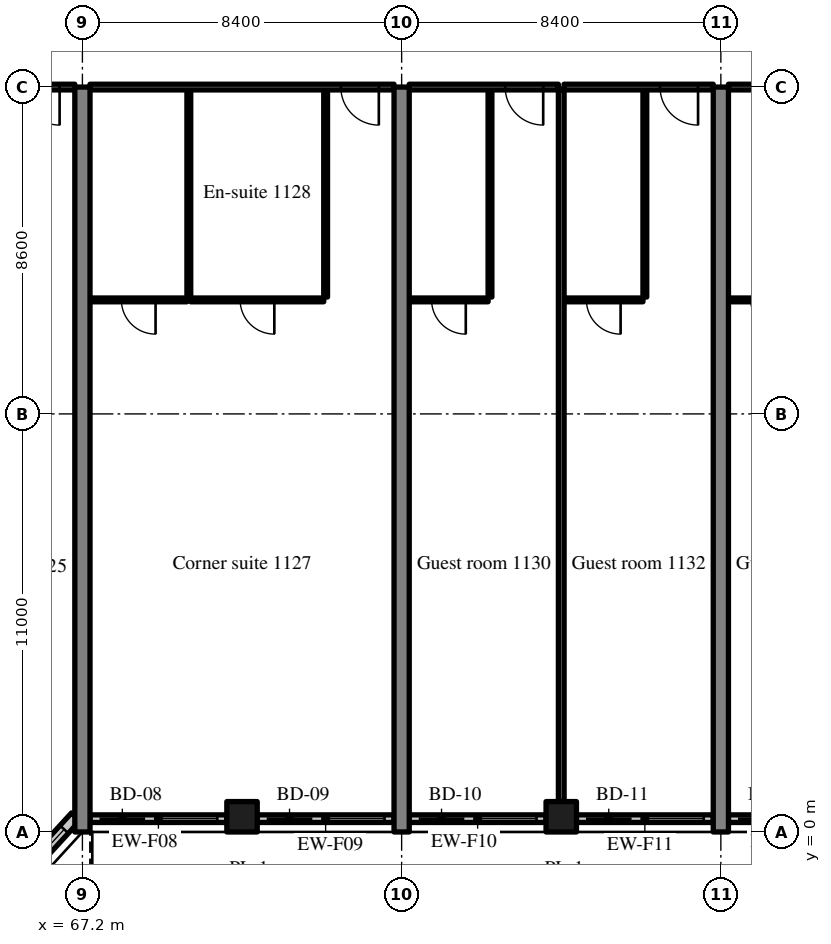
"""IFC4 building model, lengths in metres.
Left out: names, types, materials, properties, quantities, classifications, styles, units other than length and angle.
Written with IfcOpenShell. Run it as: python <this file> out.ifc"""

import sys

from ifc_helpers import new_model, si_unit, direction, frame, frame_2d, origin, origin_2d, place, context, subcontext, project, spatial, rectangle, extrude, source, transform, mapped, element, fill, save


model = new_model("IFC4")
c1 = context("Model", 3, precision=1e-05, world=origin(), true_north=direction((0.0, 1.0)))
c2 = subcontext(c1, "Body", "Model", "MODEL_VIEW")
j1 = project(units=[si_unit("LENGTHUNIT", "METRE"), si_unit("PLANEANGLEUNIT", "RADIAN")], contexts=[c1])
p1 = place(None, origin())
s1 = spatial("IfcSite", under=j1, at=p1, CompositionType="ELEMENT")
p2 = place(p1, origin())
s2 = spatial("IfcBuilding", under=s1, at=p2, CompositionType="ELEMENT")
p3 = place(p2, frame((0.0, 0.0, 50.6)))
s3 = spatial("IfcBuildingStorey", under=s2, at=p3, CompositionType="ELEMENT", Elevation=50.6)
m1 = source(origin(), c2, "Body", "SweptSolid", [
    extrude(rectangle(XDim=19.6, YDim=0.4, at=frame_2d((9.8, 0.0))), origin(), (0.0, 0.0, 1.0), 3.52),
])
for number, where, z_axis, x_axis in (
    (1, (67.2, 0.0, 0.0), (0.0, 0.0, 1.0), (0.0, 1.0, 0.0)),
    (2, (75.6, 0.0, 0.0), (0.0, 0.0, 1.0), (0.0, 1.0, 0.0)),
    (3, (84.0, 0.0, 0.0), (0.0, 0.0, 1.0), (0.0, 1.0, 0.0)),
):
    element("IfcWall", number, at=place(p3, frame(where, z_axis=z_axis, x_axis=x_axis)), inside=s3, PredefinedType="SHEAR", context=c2, shape_type="MappedRepresentation", body=[
        mapped(m1, transform((0.0, 0.0, 0.0), scale=1.0)),
    ])
m2 = source(origin(), c2, "Body", "SweptSolid", [
    extrude(rectangle(XDim=0.8, YDim=0.8, at=origin_2d()), origin(), (0.0, 0.0, 1.0), 3.52),
])
for number, where, z_axis, x_axis in (
    (4, (71.4, 0.4, 0.0), (0.0, 0.0, 1.0), (1.0, 0.0, 0.0)),
    (5, (79.8, 0.4, 0.0), (0.0, 0.0, 1.0), (1.0, 0.0, 0.0)),
):
    element("IfcColumn", number, at=place(p3, frame(where, z_axis=z_axis, x_axis=x_axis)), inside=s3, PredefinedType="COLUMN", context=c2, shape_type="MappedRepresentation", body=[
        mapped(m2, transform((0.0, 0.0, 0.0), scale=1.0)),
    ])
m3 = source(origin(), c2, "Body", "SweptSolid", [
    extrude(rectangle(XDim=2.398, YDim=0.3, at=frame_2d((1.199, 0.0))), origin(), (0.0, 0.0, 1.0), 3.52),
])
p4 = place(p3, frame((65.404, -1.369, 0.0), z_axis=(0.0, 0.0, 1.0), x_axis=(0.675374189419, 0.737475222815, 0.0)))
e6 = element("IfcWall", 6, at=p4, inside=s3, PredefinedType="SOLIDWALL", context=c2, shape_type="MappedRepresentation", body=[
    mapped(m3, transform((0.0, 0.0, 0.0), scale=1.0)),
])
m4 = source(origin(), c2, "Body", "SweptSolid", [
    extrude(rectangle(XDim=1.5, YDim=2.0, at=frame_2d((0.75, 1.0))), frame((0.0, 0.16, 0.0), z_axis=(0.0, -1.0, 0.0), x_axis=(1.0, 0.0, 0.0)), (0.0, 0.0, 1.0), 0.32),
])
p5 = place(p4, frame((0.449, 0.0, 0.9)))
e7 = element("IfcOpeningElement", 7, at=p5, cuts=e6, PredefinedType="OPENING", context=c2, shape_type="MappedRepresentation", body=[
    mapped(m4, transform((0.0, 0.0, 0.0), scale=1.0)),
])
m5 = source(origin(), c2, "Body", "SweptSolid", [
    extrude(rectangle(XDim=3.6, YDim=0.2, at=frame_2d((1.8, 0.0))), origin(), (0.0, 0.0, 1.0), 2.82),
])
p6 = place(p3, frame((67.4, 0.35, 0.0), z_axis=(0.0, 0.0, 1.0), x_axis=(1.0, 0.0, 0.0)))
e8 = element("IfcWall", 8, at=p6, inside=s3, PredefinedType="SOLIDWALL", context=c2, shape_type="MappedRepresentation", body=[
    mapped(m5, transform((0.0, 0.0, 0.0), scale=1.0)),
])
m6 = source(origin(), c2, "Body", "SweptSolid", [
    extrude(rectangle(XDim=1.2, YDim=2.4, at=frame_2d((0.6, 1.2))), frame((0.0, 0.11, 0.0), z_axis=(0.0, -1.0, 0.0), x_axis=(1.0, 0.0, 0.0)), (0.0, 0.0, 1.0), 0.22),
])
p7 = place(p6, frame((0.25, 0.0, 0.0)))
e9 = element("IfcOpeningElement", 9, at=p7, cuts=e8, PredefinedType="OPENING", context=c2, shape_type="MappedRepresentation", body=[
    mapped(m6, transform((0.0, 0.0, 0.0), scale=1.0)),
])
m7 = source(origin(), c2, "Body", "SweptSolid", [
    extrude(rectangle(XDim=1.5, YDim=1.5, at=frame_2d((0.75, 0.75))), frame((0.0, 0.11, 0.0), z_axis=(0.0, -1.0, 0.0), x_axis=(1.0, 0.0, 0.0)), (0.0, 0.0, 1.0), 0.22),
])
p8 = place(p6, frame((1.85, 0.0, 0.9)))
e10 = element("IfcOpeningElement", 10, at=p8, cuts=e8, PredefinedType="OPENING", context=c2, shape_type="MappedRepresentation", body=[
    mapped(m7, transform((0.0, 0.0, 0.0), scale=1.0)),
])
m8 = source(origin(), c2, "Body", "SweptSolid", [
    extrude(rectangle(XDim=3.6, YDim=0.2, at=frame_2d((1.8, 0.0))), origin(), (0.0, 0.0, 1.0), 2.82),
])
p9 = place(p3, frame((71.8, 0.35, 0.0), z_axis=(0.0, 0.0, 1.0), x_axis=(1.0, 0.0, 0.0)))
e11 = element("IfcWall", 11, at=p9, inside=s3, PredefinedType="SOLIDWALL", context=c2, shape_type="MappedRepresentation", body=[
    mapped(m8, transform((0.0, 0.0, 0.0), scale=1.0)),
])
p10 = place(p9, frame((0.25, 0.0, 0.0)))
e12 = element("IfcOpeningElement", 12, at=p10, cuts=e11, PredefinedType="OPENING", context=c2, shape_type="MappedRepresentation", body=[
    mapped(m6, transform((0.0, 0.0, 0.0), scale=1.0)),
])
p11 = place(p9, frame((1.85, 0.0, 0.9)))
e13 = element("IfcOpeningElement", 13, at=p11, cuts=e11, PredefinedType="OPENING", context=c2, shape_type="MappedRepresentation", body=[
    mapped(m7, transform((0.0, 0.0, 0.0), scale=1.0)),
])
p12 = place(p3, frame((75.8, 0.35, 0.0), z_axis=(0.0, 0.0, 1.0), x_axis=(1.0, 0.0, 0.0)))
e14 = element("IfcWall", 14, at=p12, inside=s3, PredefinedType="SOLIDWALL", context=c2, shape_type="MappedRepresentation", body=[
    mapped(m8, transform((0.0, 0.0, 0.0), scale=1.0)),
])
p13 = place(p12, frame((0.25, 0.0, 0.0)))
e15 = element("IfcOpeningElement", 15, at=p13, cuts=e14, PredefinedType="OPENING", context=c2, shape_type="MappedRepresentation", body=[
    mapped(m6, transform((0.0, 0.0, 0.0), scale=1.0)),
])
p14 = place(p12, frame((1.85, 0.0, 0.9)))
e16 = element("IfcOpeningElement", 16, at=p14, cuts=e14, PredefinedType="OPENING", context=c2, shape_type="MappedRepresentation", body=[
    mapped(m7, transform((0.0, 0.0, 0.0), scale=1.0)),
])
p15 = place(p3, frame((80.2, 0.35, 0.0), z_axis=(0.0, 0.0, 1.0), x_axis=(1.0, 0.0, 0.0)))
e17 = element("IfcWall", 17, at=p15, inside=s3, PredefinedType="SOLIDWALL", context=c2, shape_type="MappedRepresentation", body=[
    mapped(m5, transform((0.0, 0.0, 0.0), scale=1.0)),
])
p16 = place(p15, frame((0.25, 0.0, 0.0)))
e18 = element("IfcOpeningElement", 18, at=p16, cuts=e17, PredefinedType="OPENING", context=c2, shape_type="MappedRepresentation", body=[
    mapped(m6, transform((0.0, 0.0, 0.0), scale=1.0)),
])
p17 = place(p15, frame((1.85, 0.0, 0.9)))
e19 = element("IfcOpeningElement", 19, at=p17, cuts=e17, PredefinedType="OPENING", context=c2, shape_type="MappedRepresentation", body=[
    mapped(m7, transform((0.0, 0.0, 0.0), scale=1.0)),
])
p18 = place(p3, frame((84.2, 0.35, 0.0), z_axis=(0.0, 0.0, 1.0), x_axis=(1.0, 0.0, 0.0)))
e20 = element("IfcWall", 20, at=p18, inside=s3, PredefinedType="SOLIDWALL", context=c2, shape_type="MappedRepresentation", body=[
    mapped(m5, transform((0.0, 0.0, 0.0), scale=1.0)),
])
p19 = place(p18, frame((0.25, 0.0, 0.0)))
e21 = element("IfcOpeningElement", 21, at=p19, cuts=e20, PredefinedType="OPENING", context=c2, shape_type="MappedRepresentation", body=[
    mapped(m6, transform((0.0, 0.0, 0.0), scale=1.0)),
])
p20 = place(p18, frame((1.85, 0.0, 0.9)))
e22 = element("IfcOpeningElement", 22, at=p20, cuts=e20, PredefinedType="OPENING", context=c2, shape_type="MappedRepresentation", body=[
    mapped(m7, transform((0.0, 0.0, 0.0), scale=1.0)),
])
m9 = source(origin(), c2, "Body", "SweptSolid", [
    extrude(rectangle(XDim=3.925, YDim=0.15, at=frame_2d((1.962, 0.0))), origin(), (0.0, 0.0, 1.0), 2.82),
])
p21 = place(p3, frame((63.075, 19.6, 0.0), z_axis=(0.0, 0.0, 1.0), x_axis=(1.0, 0.0, 0.0)))
e23 = element("IfcWall", 23, at=p21, inside=s3, PredefinedType="PARTITIONING", context=c2, shape_type="MappedRepresentation", body=[
    mapped(m9, transform((0.0, 0.0, 0.0), scale=1.0)),
])
m10 = source(origin(), c2, "Body", "SweptSolid", [
    extrude(rectangle(XDim=1.0, YDim=2.1, at=frame_2d((0.5, 1.05))), frame((0.0, 0.085, 0.0), z_axis=(0.0, -1.0, 0.0), x_axis=(1.0, 0.0, 0.0)), (0.0, 0.0, 1.0), 0.17),
])
p22 = place(p21, frame((2.525, 0.0, 0.0)))
e24 = element("IfcOpeningElement", 24, at=p22, cuts=e23, PredefinedType="OPENING", context=c2, shape_type="MappedRepresentation", body=[
    mapped(m10, transform((0.0, 0.0, 0.0), scale=1.0)),
])
m11 = source(origin(), c2, "Body", "SweptSolid", [
    extrude(rectangle(XDim=5.45, YDim=0.1, at=frame_2d((2.725, 0.0))), origin(), (0.0, 0.0, 1.0), 3.52),
])
for number, where, z_axis, x_axis in (
    (25, (73.6, 14.075, 0.0), (0.0, 0.0, 1.0), (0.0, 1.0, 0.0)),
    (26, (70.0, 14.075, 0.0), (0.0, 0.0, 1.0), (0.0, 1.0, 0.0)),
):
    element("IfcWall", number, at=place(p3, frame(where, z_axis=z_axis, x_axis=x_axis)), inside=s3, PredefinedType="PARTITIONING", context=c2, shape_type="MappedRepresentation", body=[
        mapped(m11, transform((0.0, 0.0, 0.0), scale=1.0)),
    ])
m12 = source(origin(), c2, "Body", "SweptSolid", [
    extrude(rectangle(XDim=3.5, YDim=0.1, at=frame_2d((1.75, 0.0))), origin(), (0.0, 0.0, 1.0), 3.52),
])
p23 = place(p3, frame((70.05, 14.0, 0.0), z_axis=(0.0, 0.0, 1.0), x_axis=(1.0, 0.0, 0.0)))
e27 = element("IfcWall", 27, at=p23, inside=s3, PredefinedType="PARTITIONING", context=c2, shape_type="MappedRepresentation", body=[
    mapped(m12, transform((0.0, 0.0, 0.0), scale=1.0)),
])
m13 = source(origin(), c2, "Body", "SweptSolid", [
    extrude(rectangle(XDim=0.9, YDim=2.1, at=frame_2d((0.45, 1.05))), frame((0.0, 0.06, 0.0), z_axis=(0.0, -1.0, 0.0), x_axis=(1.0, 0.0, 0.0)), (0.0, 0.0, 1.0), 0.12),
])
p24 = place(p23, frame((1.3, 0.0, 0.0)))
e28 = element("IfcOpeningElement", 28, at=p24, cuts=e27, PredefinedType="OPENING", context=c2, shape_type="MappedRepresentation", body=[
    mapped(m13, transform((0.0, 0.0, 0.0), scale=1.0)),
])
m14 = source(origin(), c2, "Body", "SweptSolid", [
    extrude(rectangle(XDim=2.55, YDim=0.1, at=frame_2d((1.275, 0.0))), origin(), (0.0, 0.0, 1.0), 3.52),
])
p25 = place(p3, frame((67.4, 14.0, 0.0), z_axis=(0.0, 0.0, 1.0), x_axis=(1.0, 0.0, 0.0)))
e29 = element("IfcWall", 29, at=p25, inside=s3, PredefinedType="PARTITIONING", context=c2, shape_type="MappedRepresentation", body=[
    mapped(m14, transform((0.0, 0.0, 0.0), scale=1.0)),
])
p26 = place(p25, frame((0.825, 0.0, 0.0)))
e30 = element("IfcOpeningElement", 30, at=p26, cuts=e29, PredefinedType="OPENING", context=c2, shape_type="MappedRepresentation", body=[
    mapped(m13, transform((0.0, 0.0, 0.0), scale=1.0)),
])
m15 = source(origin(), c2, "Body", "SweptSolid", [
    extrude(rectangle(XDim=8.0, YDim=0.15, at=frame_2d((4.0, 0.0))), origin(), (0.0, 0.0, 1.0), 2.82),
])
p27 = place(p3, frame((67.4, 19.6, 0.0), z_axis=(0.0, 0.0, 1.0), x_axis=(1.0, 0.0, 0.0)))
e31 = element("IfcWall", 31, at=p27, inside=s3, PredefinedType="PARTITIONING", context=c2, shape_type="MappedRepresentation", body=[
    mapped(m15, transform((0.0, 0.0, 0.0), scale=1.0)),
])
p28 = place(p27, frame((6.6, 0.0, 0.0)))
e32 = element("IfcOpeningElement", 32, at=p28, cuts=e31, PredefinedType="OPENING", context=c2, shape_type="MappedRepresentation", body=[
    mapped(m10, transform((0.0, 0.0, 0.0), scale=1.0)),
])
p29 = place(p3, frame((77.925, 14.075, 0.0), z_axis=(0.0, 0.0, 1.0), x_axis=(0.0, 1.0, 0.0)))
e33 = element("IfcWall", 33, at=p29, inside=s3, PredefinedType="PARTITIONING", context=c2, shape_type="MappedRepresentation", body=[
    mapped(m11, transform((0.0, 0.0, 0.0), scale=1.0)),
])
m16 = source(origin(), c2, "Body", "SweptSolid", [
    extrude(rectangle(XDim=2.075, YDim=0.1, at=frame_2d((1.038, 0.0))), origin(), (0.0, 0.0, 1.0), 3.52),
])
p30 = place(p3, frame((75.8, 14.0, 0.0), z_axis=(0.0, 0.0, 1.0), x_axis=(1.0, 0.0, 0.0)))
e34 = element("IfcWall", 34, at=p30, inside=s3, PredefinedType="PARTITIONING", context=c2, shape_type="MappedRepresentation", body=[
    mapped(m16, transform((0.0, 0.0, 0.0), scale=1.0)),
])
p31 = place(p30, frame((0.588, 0.0, 0.0)))
e35 = element("IfcOpeningElement", 35, at=p31, cuts=e34, PredefinedType="OPENING", context=c2, shape_type="MappedRepresentation", body=[
    mapped(m13, transform((0.0, 0.0, 0.0), scale=1.0)),
])
p32 = place(p3, frame((75.8, 19.6, 0.0), z_axis=(0.0, 0.0, 1.0), x_axis=(1.0, 0.0, 0.0)))
e36 = element("IfcWall", 36, at=p32, inside=s3, PredefinedType="PARTITIONING", context=c2, shape_type="MappedRepresentation", body=[
    mapped(m9, transform((0.0, 0.0, 0.0), scale=1.0)),
])
p33 = place(p32, frame((2.525, 0.0, 0.0)))
e37 = element("IfcOpeningElement", 37, at=p33, cuts=e36, PredefinedType="OPENING", context=c2, shape_type="MappedRepresentation", body=[
    mapped(m10, transform((0.0, 0.0, 0.0), scale=1.0)),
])
p34 = place(p3, frame((82.0, 14.075, 0.0), z_axis=(0.0, 0.0, 1.0), x_axis=(0.0, 1.0, 0.0)))
e38 = element("IfcWall", 38, at=p34, inside=s3, PredefinedType="PARTITIONING", context=c2, shape_type="MappedRepresentation", body=[
    mapped(m11, transform((0.0, 0.0, 0.0), scale=1.0)),
])
p35 = place(p3, frame((79.875, 14.0, 0.0), z_axis=(0.0, 0.0, 1.0), x_axis=(1.0, 0.0, 0.0)))
e39 = element("IfcWall", 39, at=p35, inside=s3, PredefinedType="PARTITIONING", context=c2, shape_type="MappedRepresentation", body=[
    mapped(m16, transform((0.0, 0.0, 0.0), scale=1.0)),
])
p36 = place(p35, frame((0.587, 0.0, 0.0)))
e40 = element("IfcOpeningElement", 40, at=p36, cuts=e39, PredefinedType="OPENING", context=c2, shape_type="MappedRepresentation", body=[
    mapped(m13, transform((0.0, 0.0, 0.0), scale=1.0)),
])
p37 = place(p3, frame((79.875, 19.6, 0.0), z_axis=(0.0, 0.0, 1.0), x_axis=(1.0, 0.0, 0.0)))
e41 = element("IfcWall", 41, at=p37, inside=s3, PredefinedType="PARTITIONING", context=c2, shape_type="MappedRepresentation", body=[
    mapped(m9, transform((0.0, 0.0, 0.0), scale=1.0)),
])
p38 = place(p37, frame((2.525, 0.0, 0.0)))
e42 = element("IfcOpeningElement", 42, at=p38, cuts=e41, PredefinedType="OPENING", context=c2, shape_type="MappedRepresentation", body=[
    mapped(m10, transform((0.0, 0.0, 0.0), scale=1.0)),
])
m17 = source(origin(), c2, "Body", "SweptSolid", [
    extrude(rectangle(XDim=18.725, YDim=0.15, at=frame_2d((9.362, 0.0))), origin(), (0.0, 0.0, 1.0), 3.52),
])
p39 = place(p3, frame((79.8, 0.8, 0.0), z_axis=(0.0, 0.0, 1.0), x_axis=(0.0, 1.0, 0.0)))
e43 = element("IfcWall", 43, at=p39, inside=s3, PredefinedType="PARTITIONING", context=c2, shape_type="MappedRepresentation", body=[
    mapped(m17, transform((0.0, 0.0, 0.0), scale=1.0)),
])
p40 = place(p3, frame((84.2, 14.0, 0.0), z_axis=(0.0, 0.0, 1.0), x_axis=(1.0, 0.0, 0.0)))
e44 = element("IfcWall", 44, at=p40, inside=s3, PredefinedType="PARTITIONING", context=c2, shape_type="MappedRepresentation", body=[
    mapped(m16, transform((0.0, 0.0, 0.0), scale=1.0)),
])
p41 = place(p40, frame((0.588, 0.0, 0.0)))
e45 = element("IfcOpeningElement", 45, at=p41, cuts=e44, PredefinedType="OPENING", context=c2, shape_type="MappedRepresentation", body=[
    mapped(m13, transform((0.0, 0.0, 0.0), scale=1.0)),
])
p42 = place(p3, frame((84.2, 19.6, 0.0), z_axis=(0.0, 0.0, 1.0), x_axis=(1.0, 0.0, 0.0)))
e46 = element("IfcWall", 46, at=p42, inside=s3, PredefinedType="PARTITIONING", context=c2, shape_type="MappedRepresentation", body=[
    mapped(m9, transform((0.0, 0.0, 0.0), scale=1.0)),
])
p43 = place(p42, frame((2.525, 0.0, 0.0)))
e47 = element("IfcOpeningElement", 47, at=p43, cuts=e46, PredefinedType="OPENING", context=c2, shape_type="MappedRepresentation", body=[
    mapped(m10, transform((0.0, 0.0, 0.0), scale=1.0)),
])
m18 = source(origin(), c2, "Body", "SweptSolid", [
    extrude(rectangle(XDim=1.5, YDim=2.0, at=frame_2d((0.75, 1.0))), frame((0.0, 0.03, 0.0), z_axis=(0.0, -1.0, 0.0), x_axis=(1.0, 0.0, 0.0)), (0.0, 0.0, 1.0), 0.06),
])
p44 = place(p5, origin())
e48 = element("IfcWindow", 48, at=p44, inside=s3, PartitioningType="SINGLE_PANEL", PredefinedType="WINDOW", context=c2, shape_type="MappedRepresentation", body=[
    mapped(m18, transform((0.0, 0.0, 0.0), scale=1.0)),
])
fill(e7, e48)
m19 = source(origin(), c2, "Body", "SweptSolid", [
    extrude(rectangle(XDim=1.2, YDim=2.4, at=frame_2d((0.6, 1.2))), frame((0.0, 0.025, 0.0), z_axis=(0.0, -1.0, 0.0), x_axis=(1.0, 0.0, 0.0)), (0.0, 0.0, 1.0), 0.05),
])
p45 = place(p7, origin())
e49 = element("IfcDoor", 49, at=p45, inside=s3, OperationType="SLIDING_TO_RIGHT", PredefinedType="DOOR", context=c2, shape_type="MappedRepresentation", body=[
    mapped(m19, transform((0.0, 0.0, 0.0), scale=1.0)),
])
fill(e9, e49)
m20 = source(origin(), c2, "Body", "SweptSolid", [
    extrude(rectangle(XDim=1.5, YDim=1.5, at=frame_2d((0.75, 0.75))), frame((0.0, 0.03, 0.0), z_axis=(0.0, -1.0, 0.0), x_axis=(1.0, 0.0, 0.0)), (0.0, 0.0, 1.0), 0.06),
])
p46 = place(p8, origin())
e50 = element("IfcWindow", 50, at=p46, inside=s3, PartitioningType="SINGLE_PANEL", PredefinedType="WINDOW", context=c2, shape_type="MappedRepresentation", body=[
    mapped(m20, transform((0.0, 0.0, 0.0), scale=1.0)),
])
fill(e10, e50)
p47 = place(p10, origin())
e51 = element("IfcDoor", 51, at=p47, inside=s3, OperationType="SLIDING_TO_LEFT", PredefinedType="DOOR", context=c2, shape_type="MappedRepresentation", body=[
    mapped(m19, transform((0.0, 0.0, 0.0), scale=1.0)),
])
fill(e12, e51)
p48 = place(p11, origin())
e52 = element("IfcWindow", 52, at=p48, inside=s3, PartitioningType="SINGLE_PANEL", PredefinedType="WINDOW", context=c2, shape_type="MappedRepresentation", body=[
    mapped(m20, transform((0.0, 0.0, 0.0), scale=1.0)),
])
fill(e13, e52)
p49 = place(p13, origin())
e53 = element("IfcDoor", 53, at=p49, inside=s3, OperationType="SLIDING_TO_RIGHT", PredefinedType="DOOR", context=c2, shape_type="MappedRepresentation", body=[
    mapped(m19, transform((0.0, 0.0, 0.0), scale=1.0)),
])
fill(e15, e53)
p50 = place(p14, origin())
e54 = element("IfcWindow", 54, at=p50, inside=s3, PartitioningType="SINGLE_PANEL", PredefinedType="WINDOW", context=c2, shape_type="MappedRepresentation", body=[
    mapped(m20, transform((0.0, 0.0, 0.0), scale=1.0)),
])
fill(e16, e54)
p51 = place(p16, origin())
e55 = element("IfcDoor", 55, at=p51, inside=s3, OperationType="SLIDING_TO_LEFT", PredefinedType="DOOR", context=c2, shape_type="MappedRepresentation", body=[
    mapped(m19, transform((0.0, 0.0, 0.0), scale=1.0)),
])
fill(e18, e55)
p52 = place(p17, origin())
e56 = element("IfcWindow", 56, at=p52, inside=s3, PartitioningType="SINGLE_PANEL", PredefinedType="WINDOW", context=c2, shape_type="MappedRepresentation", body=[
    mapped(m20, transform((0.0, 0.0, 0.0), scale=1.0)),
])
fill(e19, e56)
p53 = place(p19, origin())
e57 = element("IfcDoor", 57, at=p53, inside=s3, OperationType="SLIDING_TO_RIGHT", PredefinedType="DOOR", context=c2, shape_type="MappedRepresentation", body=[
    mapped(m19, transform((0.0, 0.0, 0.0), scale=1.0)),
])
fill(e21, e57)
m21 = source(origin(), c2, "Body", "SweptSolid", [
    extrude(rectangle(XDim=1.0, YDim=2.1, at=frame_2d((0.5, 1.05))), frame((0.0, 0.025, 0.0), z_axis=(0.0, -1.0, 0.0), x_axis=(1.0, 0.0, 0.0)), (0.0, 0.0, 1.0), 0.05),
])
p54 = place(p22, origin())
e58 = element("IfcDoor", 58, at=p54, inside=s3, OperationType="SINGLE_SWING_RIGHT", PredefinedType="DOOR", context=c2, shape_type="MappedRepresentation", body=[
    mapped(m21, transform((0.0, 0.0, 0.0), scale=1.0)),
])
fill(e24, e58)
m22 = source(origin(), c2, "Body", "SweptSolid", [
    extrude(rectangle(XDim=0.9, YDim=2.1, at=frame_2d((0.45, 1.05))), frame((0.0, 0.025, 0.0), z_axis=(0.0, -1.0, 0.0), x_axis=(1.0, 0.0, 0.0)), (0.0, 0.0, 1.0), 0.05),
])
p55 = place(p24, origin())
e59 = element("IfcDoor", 59, at=p55, inside=s3, OperationType="SINGLE_SWING_RIGHT", PredefinedType="DOOR", context=c2, shape_type="MappedRepresentation", body=[
    mapped(m22, transform((0.0, 0.0, 0.0), scale=1.0)),
])
fill(e28, e59)
p56 = place(p26, origin())
e60 = element("IfcDoor", 60, at=p56, inside=s3, OperationType="SINGLE_SWING_RIGHT", PredefinedType="DOOR", context=c2, shape_type="MappedRepresentation", body=[
    mapped(m22, transform((0.0, 0.0, 0.0), scale=1.0)),
])
fill(e30, e60)
p57 = place(p28, origin())
e61 = element("IfcDoor", 61, at=p57, inside=s3, OperationType="SINGLE_SWING_RIGHT", PredefinedType="DOOR", context=c2, shape_type="MappedRepresentation", body=[
    mapped(m21, transform((0.0, 0.0, 0.0), scale=1.0)),
])
fill(e32, e61)
p58 = place(p31, origin())
e62 = element("IfcDoor", 62, at=p58, inside=s3, OperationType="SINGLE_SWING_RIGHT", PredefinedType="DOOR", context=c2, shape_type="MappedRepresentation", body=[
    mapped(m22, transform((0.0, 0.0, 0.0), scale=1.0)),
])
fill(e35, e62)
p59 = place(p33, origin())
e63 = element("IfcDoor", 63, at=p59, inside=s3, OperationType="SINGLE_SWING_RIGHT", PredefinedType="DOOR", context=c2, shape_type="MappedRepresentation", body=[
    mapped(m21, transform((0.0, 0.0, 0.0), scale=1.0)),
])
fill(e37, e63)
p60 = place(p36, origin())
e64 = element("IfcDoor", 64, at=p60, inside=s3, OperationType="SINGLE_SWING_RIGHT", PredefinedType="DOOR", context=c2, shape_type="MappedRepresentation", body=[
    mapped(m22, transform((0.0, 0.0, 0.0), scale=1.0)),
])
fill(e40, e64)
p61 = place(p38, origin())
e65 = element("IfcDoor", 65, at=p61, inside=s3, OperationType="SINGLE_SWING_RIGHT", PredefinedType="DOOR", context=c2, shape_type="MappedRepresentation", body=[
    mapped(m21, transform((0.0, 0.0, 0.0), scale=1.0)),
])
fill(e42, e65)
p62 = place(p41, origin())
e66 = element("IfcDoor", 66, at=p62, inside=s3, OperationType="SINGLE_SWING_RIGHT", PredefinedType="DOOR", context=c2, shape_type="MappedRepresentation", body=[
    mapped(m22, transform((0.0, 0.0, 0.0), scale=1.0)),
])
fill(e45, e66)
save(model, sys.argv[1])
